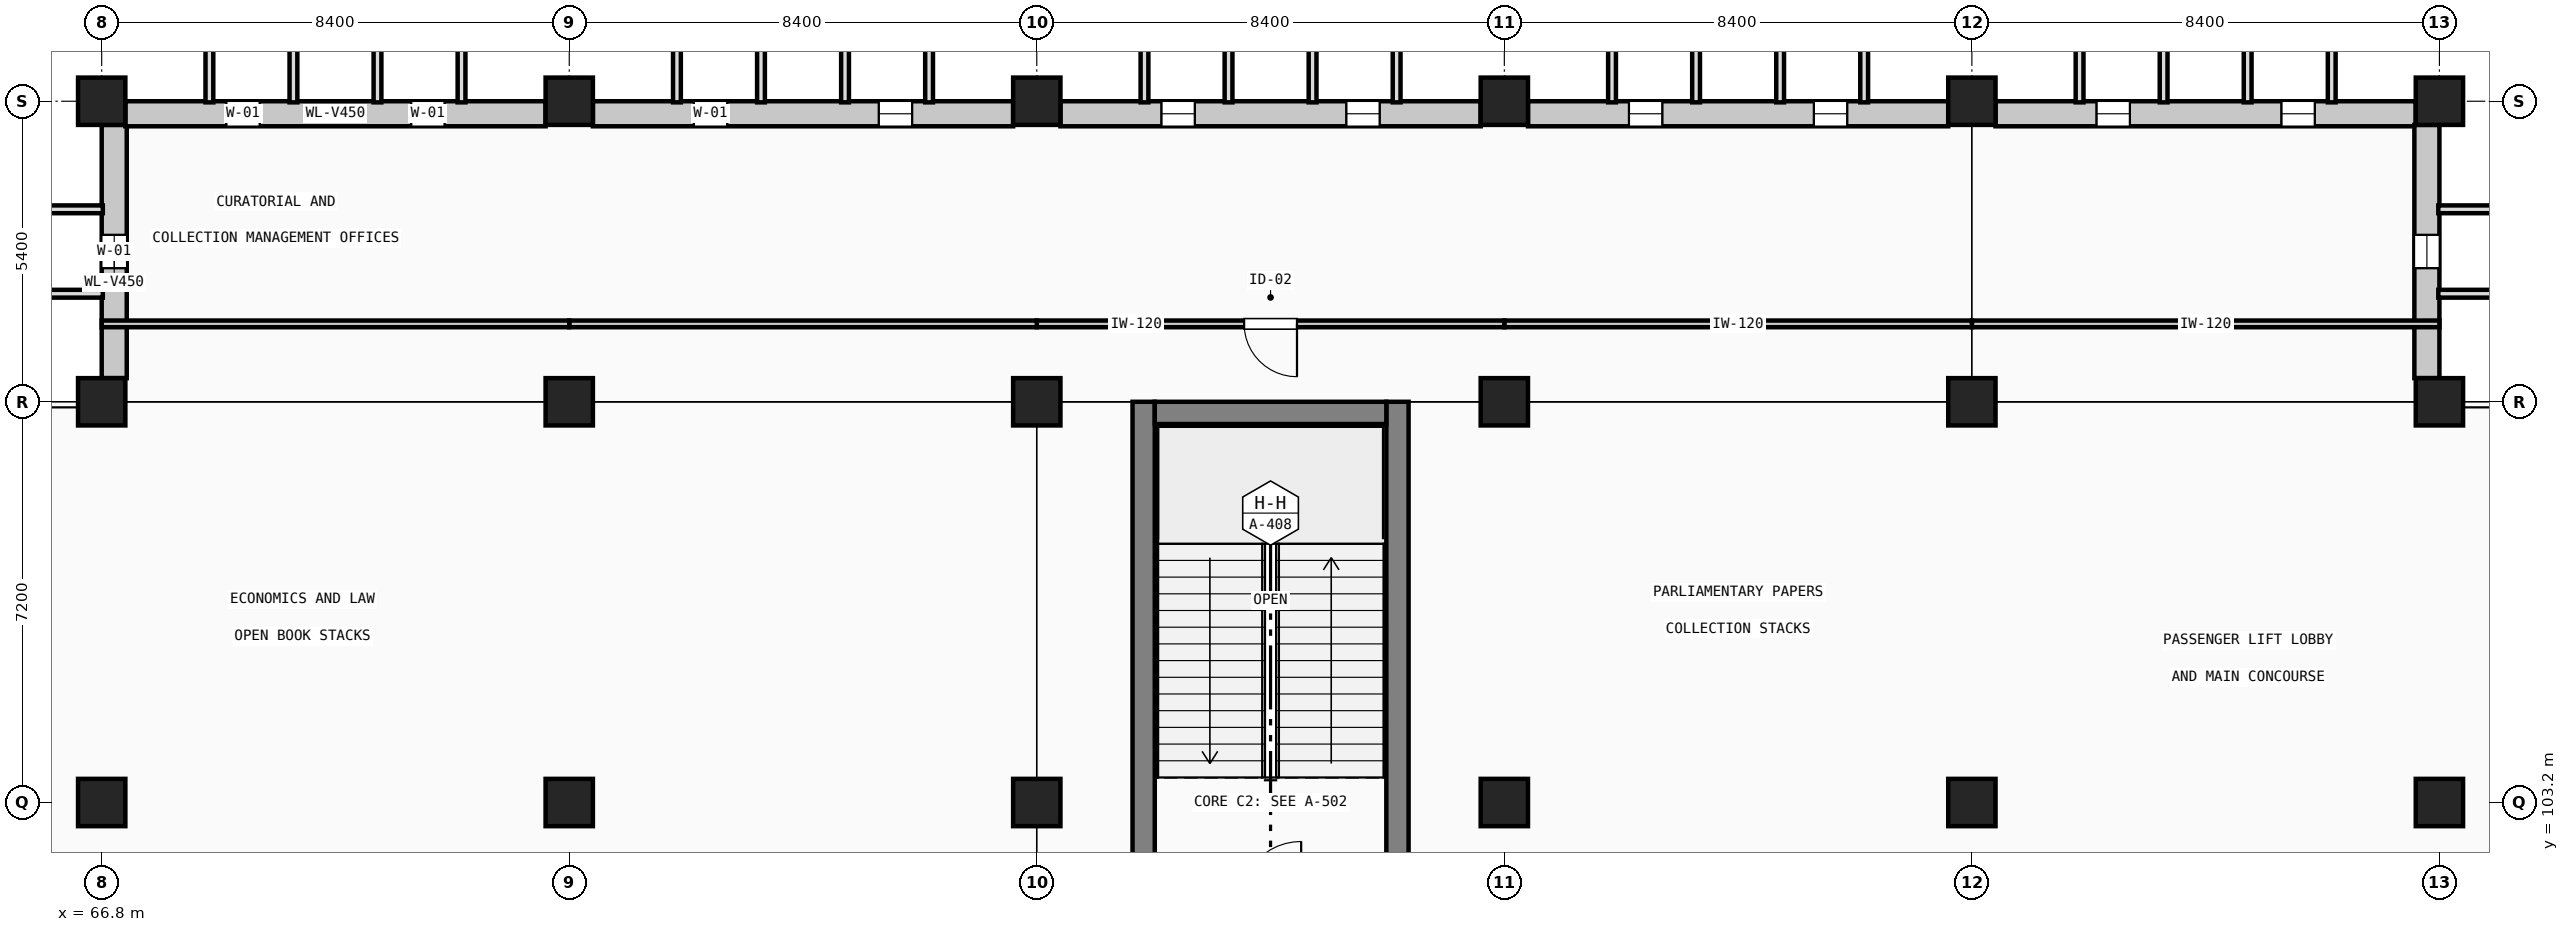
"""IFC4 building model, lengths in metres.
Left out: names, types, materials, properties, quantities, classifications, styles, units other than length and angle.
Written with IfcOpenShell. Run it as: python <this file> out.ifc"""

import sys

from ifc_helpers import new_model, si_unit, direction, frame, frame_2d, origin, origin_2d, place, context, subcontext, project, spatial, rectangle, extrude, element, fill, save


model = new_model("IFC4")
c1 = context("Model", 3, precision=1e-05, world=origin(), true_north=direction((0.0, 1.0)))
c2 = subcontext(c1, "Body", "Model", "MODEL_VIEW")
j1 = project(units=[si_unit("LENGTHUNIT", "METRE"), si_unit("PLANEANGLEUNIT", "RADIAN")], contexts=[c1])
p1 = place(None, origin())
s1 = spatial("IfcSite", under=j1, at=p1, CompositionType="ELEMENT")
p2 = place(p1, origin())
s2 = spatial("IfcBuilding", under=s1, at=p2, CompositionType="ELEMENT")
p3 = place(p2, frame((0.0, 0.0, 9.6)))
s3 = spatial("IfcBuildingStorey", under=s2, at=p3, CompositionType="ELEMENT", Elevation=9.6)
for number, where, z_axis, x_axis in (
    (1, (66.8, 103.2, 0.0), (0.0, 0.0, 1.0), (1.0, 0.0, 0.0)),
    (2, (66.8, 110.4, 0.0), (0.0, 0.0, 1.0), (1.0, 0.0, 0.0)),
    (3, (66.8, 115.8, 0.0), (0.0, 0.0, 1.0), (1.0, 0.0, 0.0)),
    (4, (75.2, 103.2, 0.0), (0.0, 0.0, 1.0), (1.0, 0.0, 0.0)),
    (5, (75.2, 110.4, 0.0), (0.0, 0.0, 1.0), (1.0, 0.0, 0.0)),
    (6, (75.2, 115.8, 0.0), (0.0, 0.0, 1.0), (1.0, 0.0, 0.0)),
    (7, (83.6, 103.2, 0.0), (0.0, 0.0, 1.0), (1.0, 0.0, 0.0)),
    (8, (83.6, 110.4, 0.0), (0.0, 0.0, 1.0), (1.0, 0.0, 0.0)),
    (9, (83.6, 115.8, 0.0), (0.0, 0.0, 1.0), (1.0, 0.0, 0.0)),
    (10, (92.0, 103.2, 0.0), (0.0, 0.0, 1.0), (1.0, 0.0, 0.0)),
    (11, (92.0, 110.4, 0.0), (0.0, 0.0, 1.0), (1.0, 0.0, 0.0)),
    (12, (92.0, 115.8, 0.0), (0.0, 0.0, 1.0), (1.0, 0.0, 0.0)),
    (13, (100.4, 103.2, 0.0), (0.0, 0.0, 1.0), (1.0, 0.0, 0.0)),
    (14, (100.4, 110.4, 0.0), (0.0, 0.0, 1.0), (1.0, 0.0, 0.0)),
    (15, (100.4, 115.8, 0.0), (0.0, 0.0, 1.0), (1.0, 0.0, 0.0)),
    (16, (108.8, 103.2, 0.0), (0.0, 0.0, 1.0), (1.0, 0.0, 0.0)),
    (17, (108.8, 110.4, 0.0), (0.0, 0.0, 1.0), (1.0, 0.0, 0.0)),
    (18, (108.8, 115.8, 0.0), (0.0, 0.0, 1.0), (1.0, 0.0, 0.0)),
):
    element("IfcColumn", number, at=place(p3, frame(where, z_axis=z_axis, x_axis=x_axis)), inside=s3, PredefinedType="COLUMN", context=c2, shape_type="SweptSolid", body=[
        extrude(rectangle(XDim=0.85, YDim=0.85, at=origin_2d()), origin(), (0.0, 0.0, 1.0), 4.8),
    ])
for number, where, z_axis, x_axis in (
    (19, (85.52, 101.2, 0.0), (0.0, 0.0, 1.0), (0.0, 1.0, 0.0)),
    (20, (90.08, 110.4, 0.0), (0.0, 0.0, 1.0), (0.0, -1.0, 0.0)),
):
    element("IfcWall", number, at=place(p3, frame(where, z_axis=z_axis, x_axis=x_axis)), inside=s3, PredefinedType="SHEAR", context=c2, shape_type="SweptSolid", body=[
        extrude(rectangle(XDim=9.2, YDim=0.4, at=frame_2d((4.6, 0.0))), origin(), (0.0, 0.0, 1.0), 4.5),
    ])
p4 = place(p3, frame((85.72, 110.2, 0.0), z_axis=(0.0, 0.0, 1.0), x_axis=(1.0, 0.0, 0.0)))
e21 = element("IfcWall", 21, at=p4, inside=s3, PredefinedType="SHEAR", context=c2, shape_type="SweptSolid", body=[
    extrude(rectangle(XDim=4.16, YDim=0.4, at=frame_2d((2.08, 0.0))), origin(), (0.0, 0.0, 1.0), 4.5),
])
p5 = place(p3, frame((67.025, 110.825, 0.0), z_axis=(0.0, 0.0, 1.0), x_axis=(0.0, 1.0, 0.0)))
e22 = element("IfcWall", 22, at=p5, inside=s3, PredefinedType="SOLIDWALL", context=c2, shape_type="SweptSolid", body=[
    extrude(rectangle(XDim=4.55, YDim=0.45, at=frame_2d((2.275, 0.0))), origin(), (0.0, 0.0, 1.0), 4.55),
])
p6 = place(p5, frame((1.975, 0.0, 0.9)))
e23 = element("IfcOpeningElement", 23, at=p6, cuts=e22, PredefinedType="OPENING", context=c2, shape_type="SweptSolid", body=[
    extrude(rectangle(XDim=0.6, YDim=2.4, at=frame_2d((0.3, 1.2))), frame((0.0, 0.235, 0.0), z_axis=(0.0, -1.0, 0.0), x_axis=(1.0, 0.0, 0.0)), (0.0, 0.0, 1.0), 0.47),
])
p7 = place(p3, frame((67.225, 115.575, 0.0), z_axis=(0.0, 0.0, 1.0), x_axis=(1.0, 0.0, 0.0)))
e24 = element("IfcWall", 24, at=p7, inside=s3, PredefinedType="SOLIDWALL", context=c2, shape_type="SweptSolid", body=[
    extrude(rectangle(XDim=7.55, YDim=0.45, at=frame_2d((3.775, 0.0))), origin(), (0.0, 0.0, 1.0), 3.75),
])
p8 = place(p7, frame((1.814, 0.0, 0.9)))
e25 = element("IfcOpeningElement", 25, at=p8, cuts=e24, PredefinedType="OPENING", context=c2, shape_type="SweptSolid", body=[
    extrude(rectangle(XDim=0.6, YDim=2.4, at=frame_2d((0.3, 1.2))), frame((0.0, 0.235, 0.0), z_axis=(0.0, -1.0, 0.0), x_axis=(1.0, 0.0, 0.0)), (0.0, 0.0, 1.0), 0.47),
])
p9 = place(p7, frame((5.136, 0.0, 0.9)))
e26 = element("IfcOpeningElement", 26, at=p9, cuts=e24, PredefinedType="OPENING", context=c2, shape_type="SweptSolid", body=[
    extrude(rectangle(XDim=0.6, YDim=2.4, at=frame_2d((0.3, 1.2))), frame((0.0, 0.235, 0.0), z_axis=(0.0, -1.0, 0.0), x_axis=(1.0, 0.0, 0.0)), (0.0, 0.0, 1.0), 0.47),
])
p10 = place(p3, frame((75.625, 115.575, 0.0), z_axis=(0.0, 0.0, 1.0), x_axis=(1.0, 0.0, 0.0)))
e27 = element("IfcWall", 27, at=p10, inside=s3, PredefinedType="SOLIDWALL", context=c2, shape_type="SweptSolid", body=[
    extrude(rectangle(XDim=7.55, YDim=0.45, at=frame_2d((3.775, 0.0))), origin(), (0.0, 0.0, 1.0), 3.75),
])
p11 = place(p10, frame((1.814, 0.0, 0.9)))
e28 = element("IfcOpeningElement", 28, at=p11, cuts=e27, PredefinedType="OPENING", context=c2, shape_type="SweptSolid", body=[
    extrude(rectangle(XDim=0.6, YDim=2.4, at=frame_2d((0.3, 1.2))), frame((0.0, 0.235, 0.0), z_axis=(0.0, -1.0, 0.0), x_axis=(1.0, 0.0, 0.0)), (0.0, 0.0, 1.0), 0.47),
])
p12 = place(p10, frame((5.136, 0.0, 0.9)))
e29 = element("IfcOpeningElement", 29, at=p12, cuts=e27, PredefinedType="OPENING", context=c2, shape_type="SweptSolid", body=[
    extrude(rectangle(XDim=0.6, YDim=2.4, at=frame_2d((0.3, 1.2))), frame((0.0, 0.235, 0.0), z_axis=(0.0, -1.0, 0.0), x_axis=(1.0, 0.0, 0.0)), (0.0, 0.0, 1.0), 0.47),
])
p13 = place(p3, frame((84.025, 115.575, 0.0), z_axis=(0.0, 0.0, 1.0), x_axis=(1.0, 0.0, 0.0)))
e30 = element("IfcWall", 30, at=p13, inside=s3, PredefinedType="SOLIDWALL", context=c2, shape_type="SweptSolid", body=[
    extrude(rectangle(XDim=7.55, YDim=0.45, at=frame_2d((3.775, 0.0))), origin(), (0.0, 0.0, 1.0), 3.75),
])
p14 = place(p13, frame((1.814, 0.0, 0.9)))
e31 = element("IfcOpeningElement", 31, at=p14, cuts=e30, PredefinedType="OPENING", context=c2, shape_type="SweptSolid", body=[
    extrude(rectangle(XDim=0.6, YDim=2.4, at=frame_2d((0.3, 1.2))), frame((0.0, 0.235, 0.0), z_axis=(0.0, -1.0, 0.0), x_axis=(1.0, 0.0, 0.0)), (0.0, 0.0, 1.0), 0.47),
])
p15 = place(p13, frame((5.136, 0.0, 0.9)))
e32 = element("IfcOpeningElement", 32, at=p15, cuts=e30, PredefinedType="OPENING", context=c2, shape_type="SweptSolid", body=[
    extrude(rectangle(XDim=0.6, YDim=2.4, at=frame_2d((0.3, 1.2))), frame((0.0, 0.235, 0.0), z_axis=(0.0, -1.0, 0.0), x_axis=(1.0, 0.0, 0.0)), (0.0, 0.0, 1.0), 0.47),
])
p16 = place(p3, frame((92.425, 115.575, 0.0), z_axis=(0.0, 0.0, 1.0), x_axis=(1.0, 0.0, 0.0)))
e33 = element("IfcWall", 33, at=p16, inside=s3, PredefinedType="SOLIDWALL", context=c2, shape_type="SweptSolid", body=[
    extrude(rectangle(XDim=7.55, YDim=0.45, at=frame_2d((3.775, 0.0))), origin(), (0.0, 0.0, 1.0), 3.75),
])
p17 = place(p16, frame((1.814, 0.0, 0.9)))
e34 = element("IfcOpeningElement", 34, at=p17, cuts=e33, PredefinedType="OPENING", context=c2, shape_type="SweptSolid", body=[
    extrude(rectangle(XDim=0.6, YDim=2.4, at=frame_2d((0.3, 1.2))), frame((0.0, 0.235, 0.0), z_axis=(0.0, -1.0, 0.0), x_axis=(1.0, 0.0, 0.0)), (0.0, 0.0, 1.0), 0.47),
])
p18 = place(p16, frame((5.136, 0.0, 0.9)))
e35 = element("IfcOpeningElement", 35, at=p18, cuts=e33, PredefinedType="OPENING", context=c2, shape_type="SweptSolid", body=[
    extrude(rectangle(XDim=0.6, YDim=2.4, at=frame_2d((0.3, 1.2))), frame((0.0, 0.235, 0.0), z_axis=(0.0, -1.0, 0.0), x_axis=(1.0, 0.0, 0.0)), (0.0, 0.0, 1.0), 0.47),
])
p19 = place(p3, frame((100.825, 115.575, 0.0), z_axis=(0.0, 0.0, 1.0), x_axis=(1.0, 0.0, 0.0)))
e36 = element("IfcWall", 36, at=p19, inside=s3, PredefinedType="SOLIDWALL", context=c2, shape_type="SweptSolid", body=[
    extrude(rectangle(XDim=7.55, YDim=0.45, at=frame_2d((3.775, 0.0))), origin(), (0.0, 0.0, 1.0), 3.75),
])
p20 = place(p19, frame((1.814, 0.0, 0.9)))
e37 = element("IfcOpeningElement", 37, at=p20, cuts=e36, PredefinedType="OPENING", context=c2, shape_type="SweptSolid", body=[
    extrude(rectangle(XDim=0.6, YDim=2.4, at=frame_2d((0.3, 1.2))), frame((0.0, 0.235, 0.0), z_axis=(0.0, -1.0, 0.0), x_axis=(1.0, 0.0, 0.0)), (0.0, 0.0, 1.0), 0.47),
])
p21 = place(p19, frame((5.136, 0.0, 0.9)))
e38 = element("IfcOpeningElement", 38, at=p21, cuts=e36, PredefinedType="OPENING", context=c2, shape_type="SweptSolid", body=[
    extrude(rectangle(XDim=0.6, YDim=2.4, at=frame_2d((0.3, 1.2))), frame((0.0, 0.235, 0.0), z_axis=(0.0, -1.0, 0.0), x_axis=(1.0, 0.0, 0.0)), (0.0, 0.0, 1.0), 0.47),
])
p22 = place(p3, frame((108.575, 115.375, 0.0), z_axis=(0.0, 0.0, 1.0), x_axis=(0.0, -1.0, 0.0)))
e39 = element("IfcWall", 39, at=p22, inside=s3, PredefinedType="SOLIDWALL", context=c2, shape_type="SweptSolid", body=[
    extrude(rectangle(XDim=4.55, YDim=0.45, at=frame_2d((2.275, 0.0))), origin(), (0.0, 0.0, 1.0), 4.55),
])
p23 = place(p22, frame((1.975, 0.0, 0.9)))
e40 = element("IfcOpeningElement", 40, at=p23, cuts=e39, PredefinedType="OPENING", context=c2, shape_type="SweptSolid", body=[
    extrude(rectangle(XDim=0.6, YDim=2.4, at=frame_2d((0.3, 1.2))), frame((0.0, 0.235, 0.0), z_axis=(0.0, -1.0, 0.0), x_axis=(1.0, 0.0, 0.0)), (0.0, 0.0, 1.0), 0.47),
])
p24 = place(p3, frame((108.8, 111.8, 0.0), z_axis=(0.0, 0.0, 1.0), x_axis=(-1.0, 0.0, 0.0)))
e41 = element("IfcWall", 41, at=p24, inside=s3, PredefinedType="PARTITIONING", context=c2, shape_type="SweptSolid", body=[
    extrude(rectangle(XDim=8.4, YDim=0.12, at=frame_2d((4.2, 0.0))), origin(), (0.0, 0.0, 1.0), 4.55),
])
p25 = place(p3, frame((100.4, 111.8, 0.0), z_axis=(0.0, 0.0, 1.0), x_axis=(-1.0, 0.0, 0.0)))
e42 = element("IfcWall", 42, at=p25, inside=s3, PredefinedType="PARTITIONING", context=c2, shape_type="SweptSolid", body=[
    extrude(rectangle(XDim=8.4, YDim=0.12, at=frame_2d((4.2, 0.0))), origin(), (0.0, 0.0, 1.0), 4.55),
])
p26 = place(p3, frame((92.0, 111.8, 0.0), z_axis=(0.0, 0.0, 1.0), x_axis=(-1.0, 0.0, 0.0)))
e43 = element("IfcWall", 43, at=p26, inside=s3, PredefinedType="PARTITIONING", context=c2, shape_type="SweptSolid", body=[
    extrude(rectangle(XDim=8.4, YDim=0.12, at=frame_2d((4.2, 0.0))), origin(), (0.0, 0.0, 1.0), 4.55),
])
p27 = place(p26, frame((3.725, 0.0, 0.0)))
e44 = element("IfcOpeningElement", 44, at=p27, cuts=e43, PredefinedType="OPENING", context=c2, shape_type="SweptSolid", body=[
    extrude(rectangle(XDim=0.95, YDim=2.15, at=frame_2d((0.475, 1.075))), frame((0.0, 0.07, 0.0), z_axis=(0.0, -1.0, 0.0), x_axis=(1.0, 0.0, 0.0)), (0.0, 0.0, 1.0), 0.14),
])
p28 = place(p3, frame((83.6, 111.8, 0.0), z_axis=(0.0, 0.0, 1.0), x_axis=(-1.0, 0.0, 0.0)))
e45 = element("IfcWall", 45, at=p28, inside=s3, PredefinedType="PARTITIONING", context=c2, shape_type="SweptSolid", body=[
    extrude(rectangle(XDim=8.4, YDim=0.12, at=frame_2d((4.2, 0.0))), origin(), (0.0, 0.0, 1.0), 4.55),
])
p29 = place(p3, frame((75.2, 111.8, 0.0), z_axis=(0.0, 0.0, 1.0), x_axis=(-1.0, 0.0, 0.0)))
e46 = element("IfcWall", 46, at=p29, inside=s3, PredefinedType="PARTITIONING", context=c2, shape_type="SweptSolid", body=[
    extrude(rectangle(XDim=8.4, YDim=0.12, at=frame_2d((4.2, 0.0))), origin(), (0.0, 0.0, 1.0), 4.55),
])
p30 = place(p6, origin())
e47 = element("IfcWindow", 47, at=p30, inside=s3, PartitioningType="SINGLE_PANEL", PredefinedType="WINDOW", context=c2, shape_type="SweptSolid", body=[
    extrude(rectangle(XDim=0.6, YDim=2.4, at=frame_2d((0.3, 1.2))), frame((0.0, 0.03, 0.0), z_axis=(0.0, -1.0, 0.0), x_axis=(1.0, 0.0, 0.0)), (0.0, 0.0, 1.0), 0.06),
])
fill(e23, e47)
p31 = place(p8, origin())
e48 = element("IfcWindow", 48, at=p31, inside=s3, PartitioningType="SINGLE_PANEL", PredefinedType="WINDOW", context=c2, shape_type="SweptSolid", body=[
    extrude(rectangle(XDim=0.6, YDim=2.4, at=frame_2d((0.3, 1.2))), frame((0.0, 0.03, 0.0), z_axis=(0.0, -1.0, 0.0), x_axis=(1.0, 0.0, 0.0)), (0.0, 0.0, 1.0), 0.06),
])
fill(e25, e48)
p32 = place(p9, origin())
e49 = element("IfcWindow", 49, at=p32, inside=s3, PartitioningType="SINGLE_PANEL", PredefinedType="WINDOW", context=c2, shape_type="SweptSolid", body=[
    extrude(rectangle(XDim=0.6, YDim=2.4, at=frame_2d((0.3, 1.2))), frame((0.0, 0.03, 0.0), z_axis=(0.0, -1.0, 0.0), x_axis=(1.0, 0.0, 0.0)), (0.0, 0.0, 1.0), 0.06),
])
fill(e26, e49)
p33 = place(p11, origin())
e50 = element("IfcWindow", 50, at=p33, inside=s3, PartitioningType="SINGLE_PANEL", PredefinedType="WINDOW", context=c2, shape_type="SweptSolid", body=[
    extrude(rectangle(XDim=0.6, YDim=2.4, at=frame_2d((0.3, 1.2))), frame((0.0, 0.03, 0.0), z_axis=(0.0, -1.0, 0.0), x_axis=(1.0, 0.0, 0.0)), (0.0, 0.0, 1.0), 0.06),
])
fill(e28, e50)
p34 = place(p12, origin())
e51 = element("IfcWindow", 51, at=p34, inside=s3, PartitioningType="SINGLE_PANEL", PredefinedType="WINDOW", context=c2, shape_type="SweptSolid", body=[
    extrude(rectangle(XDim=0.6, YDim=2.4, at=frame_2d((0.3, 1.2))), frame((0.0, 0.03, 0.0), z_axis=(0.0, -1.0, 0.0), x_axis=(1.0, 0.0, 0.0)), (0.0, 0.0, 1.0), 0.06),
])
fill(e29, e51)
p35 = place(p14, origin())
e52 = element("IfcWindow", 52, at=p35, inside=s3, PartitioningType="SINGLE_PANEL", PredefinedType="WINDOW", context=c2, shape_type="SweptSolid", body=[
    extrude(rectangle(XDim=0.6, YDim=2.4, at=frame_2d((0.3, 1.2))), frame((0.0, 0.03, 0.0), z_axis=(0.0, -1.0, 0.0), x_axis=(1.0, 0.0, 0.0)), (0.0, 0.0, 1.0), 0.06),
])
fill(e31, e52)
p36 = place(p15, origin())
e53 = element("IfcWindow", 53, at=p36, inside=s3, PartitioningType="SINGLE_PANEL", PredefinedType="WINDOW", context=c2, shape_type="SweptSolid", body=[
    extrude(rectangle(XDim=0.6, YDim=2.4, at=frame_2d((0.3, 1.2))), frame((0.0, 0.03, 0.0), z_axis=(0.0, -1.0, 0.0), x_axis=(1.0, 0.0, 0.0)), (0.0, 0.0, 1.0), 0.06),
])
fill(e32, e53)
p37 = place(p17, origin())
e54 = element("IfcWindow", 54, at=p37, inside=s3, PartitioningType="SINGLE_PANEL", PredefinedType="WINDOW", context=c2, shape_type="SweptSolid", body=[
    extrude(rectangle(XDim=0.6, YDim=2.4, at=frame_2d((0.3, 1.2))), frame((0.0, 0.03, 0.0), z_axis=(0.0, -1.0, 0.0), x_axis=(1.0, 0.0, 0.0)), (0.0, 0.0, 1.0), 0.06),
])
fill(e34, e54)
p38 = place(p18, origin())
e55 = element("IfcWindow", 55, at=p38, inside=s3, PartitioningType="SINGLE_PANEL", PredefinedType="WINDOW", context=c2, shape_type="SweptSolid", body=[
    extrude(rectangle(XDim=0.6, YDim=2.4, at=frame_2d((0.3, 1.2))), frame((0.0, 0.03, 0.0), z_axis=(0.0, -1.0, 0.0), x_axis=(1.0, 0.0, 0.0)), (0.0, 0.0, 1.0), 0.06),
])
fill(e35, e55)
p39 = place(p20, origin())
e56 = element("IfcWindow", 56, at=p39, inside=s3, PartitioningType="SINGLE_PANEL", PredefinedType="WINDOW", context=c2, shape_type="SweptSolid", body=[
    extrude(rectangle(XDim=0.6, YDim=2.4, at=frame_2d((0.3, 1.2))), frame((0.0, 0.03, 0.0), z_axis=(0.0, -1.0, 0.0), x_axis=(1.0, 0.0, 0.0)), (0.0, 0.0, 1.0), 0.06),
])
fill(e37, e56)
p40 = place(p21, origin())
e57 = element("IfcWindow", 57, at=p40, inside=s3, PartitioningType="SINGLE_PANEL", PredefinedType="WINDOW", context=c2, shape_type="SweptSolid", body=[
    extrude(rectangle(XDim=0.6, YDim=2.4, at=frame_2d((0.3, 1.2))), frame((0.0, 0.03, 0.0), z_axis=(0.0, -1.0, 0.0), x_axis=(1.0, 0.0, 0.0)), (0.0, 0.0, 1.0), 0.06),
])
fill(e38, e57)
p41 = place(p23, origin())
e58 = element("IfcWindow", 58, at=p41, inside=s3, PartitioningType="SINGLE_PANEL", PredefinedType="WINDOW", context=c2, shape_type="SweptSolid", body=[
    extrude(rectangle(XDim=0.6, YDim=2.4, at=frame_2d((0.3, 1.2))), frame((0.0, 0.03, 0.0), z_axis=(0.0, -1.0, 0.0), x_axis=(1.0, 0.0, 0.0)), (0.0, 0.0, 1.0), 0.06),
])
fill(e40, e58)
p42 = place(p27, origin())
e59 = element("IfcDoor", 59, at=p42, inside=s3, OperationType="SINGLE_SWING_LEFT", PredefinedType="DOOR", context=c2, shape_type="SweptSolid", body=[
    extrude(rectangle(XDim=0.95, YDim=2.15, at=frame_2d((0.475, 1.075))), frame((0.0, 0.025, 0.0), z_axis=(0.0, -1.0, 0.0), x_axis=(1.0, 0.0, 0.0)), (0.0, 0.0, 1.0), 0.05),
])
fill(e44, e59)
save(model, sys.argv[1])
